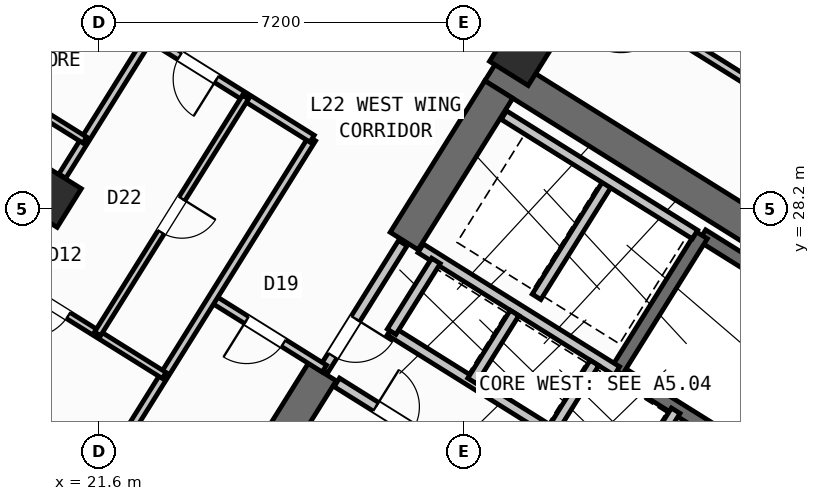
"""IFC4 building model, lengths in metres.
Left out: names, types, materials, properties, quantities, classifications, styles, units other than length and angle.
Written with IfcOpenShell. Run it as: python <this file> out.ifc"""

import sys

from ifc_helpers import new_model, si_unit, direction, frame, frame_2d, origin, origin_2d, place, context, subcontext, project, spatial, rectangle, hollow_rectangle, extrude, source, transform, mapped, element, fill, save


model = new_model("IFC4")
c1 = context("Model", 3, precision=1e-05, world=origin(), true_north=direction((0.0, 1.0)))
c2 = subcontext(c1, "Body", "Model", "MODEL_VIEW")
j1 = project(units=[si_unit("LENGTHUNIT", "METRE"), si_unit("PLANEANGLEUNIT", "RADIAN")], contexts=[c1])
p1 = place(None, origin())
s1 = spatial("IfcSite", under=j1, at=p1, CompositionType="ELEMENT")
p2 = place(p1, origin())
s2 = spatial("IfcBuilding", under=s1, at=p2, CompositionType="ELEMENT")
p3 = place(p2, frame((0.0, 0.0, 90.0)))
s3 = spatial("IfcBuildingStorey", under=s2, at=p3, CompositionType="ELEMENT", Elevation=90.0)
p4 = place(p3, frame((40.615, 23.983, 0.0), z_axis=(0.0, 0.0, 1.0), x_axis=(-0.848045953968, 0.529922692436, 0.0)))
e1 = element("IfcWall", 1, at=p4, inside=s3, PredefinedType="SHEAR", context=c2, shape_type="SweptSolid", body=[
    extrude(rectangle(XDim=13.24, YDim=0.65, at=frame_2d((6.62, 0.0))), origin(), (0.0, 0.0, 1.0), 3.35),
])
p5 = place(p3, frame((29.491, 30.552, 0.0), z_axis=(0.0, 0.0, 1.0), x_axis=(-0.529893103397, -0.8480644427, 0.0)))
e2 = element("IfcWall", 2, at=p5, inside=s3, PredefinedType="SHEAR", context=c2, shape_type="SweptSolid", body=[
    extrude(rectangle(XDim=3.525, YDim=0.65, at=frame_2d((1.763, 0.0))), origin(), (0.0, 0.0, 1.0), 3.35),
])
p6 = place(p3, frame((26.007, 24.976, 0.0), z_axis=(0.0, 0.0, 1.0), x_axis=(-0.529916319127, -0.848049936456, 0.0)))
e3 = element("IfcWall", 3, at=p6, inside=s3, PredefinedType="SHEAR", context=c2, shape_type="SweptSolid", body=[
    extrude(rectangle(XDim=6.375, YDim=0.65, at=frame_2d((3.188, 0.0))), origin(), (0.0, 0.0, 1.0), 3.35),
])
m1 = source(origin(), c2, "Body", "SweptSolid", [
    extrude(hollow_rectangle(XDim=0.9, YDim=0.9, WallThickness=0.036, at=origin_2d()), origin(), (0.0, 0.0, 1.0), 3.6),
])
for number, where, z_axis, x_axis in (
    (4, (29.928, 31.251, 0.0), (0.0, 0.0, 1.0), (-0.848, 0.53, 0.0)),
    (5, (20.632, 28.452, 0.0), (0.0, 0.0, 1.0), (-0.848, 0.53, 0.0)),
):
    element("IfcColumn", number, at=place(p3, frame(where, z_axis=z_axis, x_axis=x_axis)), inside=s3, PredefinedType="COLUMN", context=c2, shape_type="MappedRepresentation", body=[
        mapped(m1, transform((0.0, 0.0, 0.0), scale=1.0)),
    ])
p7 = place(p3, frame((31.76, 12.183, 0.0), z_axis=(0.0, 0.0, 1.0), x_axis=(-0.848047074256, 0.529920899612, 0.0)))
e6 = element("IfcWall", 6, at=p7, inside=s3, PredefinedType="STANDARD", context=c2, shape_type="SweptSolid", body=[
    extrude(rectangle(XDim=30.652, YDim=0.32, at=frame_2d((15.326, 0.0))), origin(), (0.0, 0.0, 1.0), 3.35),
])
p8 = place(p7, frame((15.153, 0.0, 0.0)))
e7 = element("IfcOpeningElement", 7, at=p8, cuts=e6, PredefinedType="OPENING", context=c2, shape_type="SweptSolid", body=[
    extrude(rectangle(XDim=1.2, YDim=2.15, at=frame_2d((0.6, 1.075))), frame((0.0, 0.17, 0.0), z_axis=(0.0, -1.0, 0.0), x_axis=(1.0, 0.0, 0.0)), (0.0, 0.0, 1.0), 0.34),
])
p9 = place(p7, frame((2.002, 0.0, 0.8)))
e8 = element("IfcOpeningElement", 8, at=p9, cuts=e6, PredefinedType="OPENING", context=c2, shape_type="SweptSolid", body=[
    extrude(rectangle(XDim=2.1, YDim=1.55, at=frame_2d((1.05, 0.775))), frame((0.0, 0.17, 0.0), z_axis=(0.0, -1.0, 0.0), x_axis=(1.0, 0.0, 0.0)), (0.0, 0.0, 1.0), 0.34),
])
p10 = place(p7, frame((7.206, 0.0, 0.8)))
e9 = element("IfcOpeningElement", 9, at=p10, cuts=e6, PredefinedType="OPENING", context=c2, shape_type="SweptSolid", body=[
    extrude(rectangle(XDim=2.1, YDim=1.55, at=frame_2d((1.05, 0.775))), frame((0.0, 0.17, 0.0), z_axis=(0.0, -1.0, 0.0), x_axis=(1.0, 0.0, 0.0)), (0.0, 0.0, 1.0), 0.34),
])
p11 = place(p7, frame((12.648, 0.0, 1.0)))
e10 = element("IfcOpeningElement", 10, at=p11, cuts=e6, PredefinedType="OPENING", context=c2, shape_type="SweptSolid", body=[
    extrude(rectangle(XDim=0.9, YDim=1.25, at=frame_2d((0.45, 0.625))), frame((0.0, 0.17, 0.0), z_axis=(0.0, -1.0, 0.0), x_axis=(1.0, 0.0, 0.0)), (0.0, 0.0, 1.0), 0.34),
])
p12 = place(p7, frame((27.974, 0.0, 0.95)))
e11 = element("IfcOpeningElement", 11, at=p12, cuts=e6, PredefinedType="OPENING", context=c2, shape_type="SweptSolid", body=[
    extrude(rectangle(XDim=1.2, YDim=1.4, at=frame_2d((0.6, 0.7))), frame((0.0, 0.17, 0.0), z_axis=(0.0, -1.0, 0.0), x_axis=(1.0, 0.0, 0.0)), (0.0, 0.0, 1.0), 0.34),
])
p13 = place(p7, frame((18.347, 0.0, 1.0)))
e12 = element("IfcOpeningElement", 12, at=p13, cuts=e6, PredefinedType="OPENING", context=c2, shape_type="SweptSolid", body=[
    extrude(rectangle(XDim=0.9, YDim=1.25, at=frame_2d((0.45, 0.625))), frame((0.0, 0.17, 0.0), z_axis=(0.0, -1.0, 0.0), x_axis=(1.0, 0.0, 0.0)), (0.0, 0.0, 1.0), 0.34),
])
p14 = place(p7, frame((20.931, 0.0, 1.0)))
e13 = element("IfcOpeningElement", 13, at=p14, cuts=e6, PredefinedType="OPENING", context=c2, shape_type="SweptSolid", body=[
    extrude(rectangle(XDim=0.65, YDim=1.15, at=frame_2d((0.325, 0.575))), frame((0.0, 0.17, 0.0), z_axis=(0.0, -1.0, 0.0), x_axis=(1.0, 0.0, 0.0)), (0.0, 0.0, 1.0), 0.34),
])
p15 = place(p7, frame((22.938, 0.0, 1.0)))
e14 = element("IfcOpeningElement", 14, at=p15, cuts=e6, PredefinedType="OPENING", context=c2, shape_type="SweptSolid", body=[
    extrude(rectangle(XDim=0.9, YDim=1.25, at=frame_2d((0.45, 0.625))), frame((0.0, 0.17, 0.0), z_axis=(0.0, -1.0, 0.0), x_axis=(1.0, 0.0, 0.0)), (0.0, 0.0, 1.0), 0.34),
])
p16 = place(p7, frame((25.069, 0.0, 1.0)))
e15 = element("IfcOpeningElement", 15, at=p16, cuts=e6, PredefinedType="OPENING", context=c2, shape_type="SweptSolid", body=[
    extrude(rectangle(XDim=0.9, YDim=1.25, at=frame_2d((0.45, 0.625))), frame((0.0, 0.17, 0.0), z_axis=(0.0, -1.0, 0.0), x_axis=(1.0, 0.0, 0.0)), (0.0, 0.0, 1.0), 0.34),
])
p17 = place(p3, frame((39.721, 23.788, 0.0), z_axis=(0.0, 0.0, 1.0), x_axis=(-0.848054434086, 0.529909121291, 0.0)))
e16 = element("IfcWall", 16, at=p17, inside=s3, PredefinedType="SHEAR", context=c2, shape_type="SweptSolid", body=[
    extrude(rectangle(XDim=7.33, YDim=0.26, at=frame_2d((3.665, 0.0))), origin(), (0.0, 0.0, 1.0), 3.35),
])
p18 = place(p3, frame((38.046, 21.108, 0.0), z_axis=(0.0, 0.0, 1.0), x_axis=(-0.848054434086, 0.529909121291, 0.0)))
e17 = element("IfcWall", 17, at=p18, inside=s3, PredefinedType="SHEAR", context=c2, shape_type="SweptSolid", body=[
    extrude(rectangle(XDim=7.33, YDim=0.26, at=frame_2d((3.665, 0.0))), origin(), (0.0, 0.0, 1.0), 3.35),
])
p19 = place(p18, frame((0.22, 0.0, 0.0)))
e18 = element("IfcOpeningElement", 18, at=p19, cuts=e17, PredefinedType="OPENING", context=c2, shape_type="SweptSolid", body=[
    extrude(rectangle(XDim=1.1, YDim=2.1, at=frame_2d((0.55, 1.05))), frame((0.0, 0.14, 0.0), z_axis=(0.0, -1.0, 0.0), x_axis=(1.0, 0.0, 0.0)), (0.0, 0.0, 1.0), 0.28),
])
p20 = place(p3, frame((33.496, 27.677, 0.0), z_axis=(0.0, 0.0, 1.0), x_axis=(-0.529908658664, -0.84805472316, 0.0)))
e19 = element("IfcWall", 19, at=p20, inside=s3, PredefinedType="SHEAR", context=c2, shape_type="SweptSolid", body=[
    extrude(rectangle(XDim=3.16, YDim=0.26, at=frame_2d((1.58, 0.0))), origin(), (0.0, 0.0, 1.0), 3.35),
])
p21 = place(p3, frame((31.822, 24.998, 0.0), z_axis=(0.0, 0.0, 1.0), x_axis=(-0.848058348634, 0.529902856485, 0.0)))
e20 = element("IfcWall", 20, at=p21, inside=s3, PredefinedType="STANDARD", context=c2, shape_type="SweptSolid", body=[
    extrude(rectangle(XDim=4.568, YDim=0.2, at=frame_2d((2.284, 0.0))), origin(), (0.0, 0.0, 1.0), 3.34),
])
p22 = place(p3, frame((32.108, 22.814, 0.0), z_axis=(0.0, 0.0, 1.0), x_axis=(-0.848042229521, 0.529928652696, 0.0)))
e21 = element("IfcWall", 21, at=p22, inside=s3, PredefinedType="STANDARD", context=c2, shape_type="SweptSolid", body=[
    extrude(rectangle(XDim=5.62, YDim=0.2, at=frame_2d((2.81, 0.0))), origin(), (0.0, 0.0, 1.0), 3.34),
])
p23 = place(p3, frame((32.982, 24.213, 0.0), z_axis=(0.0, 0.0, 1.0), x_axis=(-0.529839334948, -0.84809803628, 0.0)))
e22 = element("IfcWall", 22, at=p23, inside=s3, PredefinedType="STANDARD", context=c2, shape_type="SweptSolid", body=[
    extrude(rectangle(XDim=1.65, YDim=0.2, at=frame_2d((0.825, 0.0))), origin(), (0.0, 0.0, 1.0), 3.34),
])
p24 = place(p3, frame((28.25, 27.17, 0.0), z_axis=(0.0, 0.0, 1.0), x_axis=(-0.529905827651, -0.848056492117, 0.0)))
e23 = element("IfcWall", 23, at=p24, inside=s3, PredefinedType="STANDARD", context=c2, shape_type="SweptSolid", body=[
    extrude(rectangle(XDim=1.65, YDim=0.2, at=frame_2d((0.825, 0.0))), origin(), (0.0, 0.0, 1.0), 3.34),
])
p25 = place(p3, frame((31.645, 28.716, 0.0), z_axis=(0.0, 0.0, 1.0), x_axis=(-0.52986693015, -0.848080795876, 0.0)))
e24 = element("IfcWall", 24, at=p25, inside=s3, PredefinedType="STANDARD", context=c2, shape_type="SweptSolid", body=[
    extrude(rectangle(XDim=2.66, YDim=0.2, at=frame_2d((1.33, 0.0))), origin(), (0.0, 0.0, 1.0), 3.34),
])
p26 = place(p3, frame((33.363, 27.69, 0.0), z_axis=(0.0, 0.0, 1.0), x_axis=(-0.848053806312, 0.529910125964, 0.0)))
e25 = element("IfcWall", 25, at=p26, inside=s3, PredefinedType="STANDARD", context=c2, shape_type="SweptSolid", body=[
    extrude(rectangle(XDim=4.448, YDim=0.2, at=frame_2d((2.224, 0.0))), origin(), (0.0, 0.0, 1.0), 3.34),
])
for number, where, z_axis, x_axis in (
    (26, (31.379, 25.156, 0.0), (0.0, 0.0, 1.0), (-0.53, -0.848, 0.0)),
    (27, (29.801, 26.142, 0.0), (0.0, 0.0, 1.0), (-0.53, -0.848, 0.0)),
):
    element("IfcWall", number, at=place(p3, frame(where, z_axis=z_axis, x_axis=x_axis)), inside=s3, PredefinedType="STANDARD", context=c2, shape_type="SweptSolid", body=[
        extrude(rectangle(XDim=1.58, YDim=0.2, at=frame_2d((0.79, 0.0))), origin(), (0.0, 0.0, 1.0), 3.34),
    ])
p27 = place(p3, frame((31.525, 21.504, 0.0), z_axis=(0.0, 0.0, 1.0), x_axis=(-0.848044998614, 0.529924221305, 0.0)))
e28 = element("IfcWall", 28, at=p27, inside=s3, PredefinedType="STANDARD", context=c2, shape_type="SweptSolid", body=[
    extrude(rectangle(XDim=6.168, YDim=0.2, at=frame_2d((3.084, 0.0))), origin(), (0.0, 0.0, 1.0), 3.34),
])
p28 = place(p27, frame((4.4, 0.0, 0.0)))
e29 = element("IfcOpeningElement", 29, at=p28, cuts=e28, PredefinedType="OPENING", context=c2, shape_type="SweptSolid", body=[
    extrude(rectangle(XDim=0.86, YDim=2.05, at=frame_2d((0.43, 1.025))), frame((0.0, 0.11, 0.0), z_axis=(0.0, -1.0, 0.0), x_axis=(1.0, 0.0, 0.0)), (0.0, 0.0, 1.0), 0.22),
])
p29 = place(p27, frame((0.35, 0.0, 0.0)))
e30 = element("IfcOpeningElement", 30, at=p29, cuts=e28, PredefinedType="OPENING", context=c2, shape_type="SweptSolid", body=[
    extrude(rectangle(XDim=0.86, YDim=2.05, at=frame_2d((0.43, 1.025))), frame((0.0, 0.11, 0.0), z_axis=(0.0, -1.0, 0.0), x_axis=(1.0, 0.0, 0.0)), (0.0, 0.0, 1.0), 0.22),
])
p30 = place(p3, frame((27.596, 27.52, 0.0), z_axis=(0.0, 0.0, 1.0), x_axis=(-0.529865479138, -0.848081702443, 0.0)))
e31 = element("IfcWall", 31, at=p30, inside=s3, PredefinedType="STANDARD", context=c2, shape_type="SweptSolid", body=[
    extrude(rectangle(XDim=2.96, YDim=0.2, at=frame_2d((1.48, 0.0))), origin(), (0.0, 0.0, 1.0), 3.34),
])
p31 = place(p30, frame((1.76, 0.0, 0.0)))
e32 = element("IfcOpeningElement", 32, at=p31, cuts=e31, PredefinedType="OPENING", context=c2, shape_type="SweptSolid", body=[
    extrude(rectangle(XDim=0.86, YDim=2.05, at=frame_2d((0.43, 1.025))), frame((0.0, 0.11, 0.0), z_axis=(0.0, -1.0, 0.0), x_axis=(1.0, 0.0, 0.0)), (0.0, 0.0, 1.0), 0.22),
])
p32 = place(p3, frame((26.049, 25.044, 0.0), z_axis=(0.0, 0.0, 1.0), x_axis=(-0.848050851465, 0.529914854792, 0.0)))
e33 = element("IfcWall", 33, at=p32, inside=s3, PredefinedType="PARTITIONING", context=c2, shape_type="SweptSolid", body=[
    extrude(rectangle(XDim=2.61, YDim=0.16, at=frame_2d((1.305, 0.0))), origin(), (0.0, 0.0, 1.0), 2.775),
])
p33 = place(p32, frame((0.95, 0.0, 0.0)))
e34 = element("IfcOpeningElement", 34, at=p33, cuts=e33, PredefinedType="OPENING", context=c2, shape_type="SweptSolid", body=[
    extrude(rectangle(XDim=0.86, YDim=2.05, at=frame_2d((0.43, 1.025))), frame((0.0, 0.09, 0.0), z_axis=(0.0, -1.0, 0.0), x_axis=(1.0, 0.0, 0.0)), (0.0, 0.0, 1.0), 0.18),
])
p34 = place(p3, frame((25.807, 29.582, 0.0), z_axis=(0.0, 0.0, 1.0), x_axis=(-0.529920357077, -0.848047413271, 0.0)))
e35 = element("IfcWall", 35, at=p34, inside=s3, PredefinedType="PARTITIONING", context=c2, shape_type="SweptSolid", body=[
    extrude(rectangle(XDim=11.45, YDim=0.16, at=frame_2d((5.725, 0.0))), origin(), (0.0, 0.0, 1.0), 3.34),
])
p35 = place(p3, frame((25.807, 29.582, 0.0), z_axis=(0.0, 0.0, 1.0), x_axis=(-0.848052408131, 0.529912363569, 0.0)))
e36 = element("IfcWall", 36, at=p35, inside=s3, PredefinedType="PARTITIONING", context=c2, shape_type="SweptSolid", body=[
    extrude(rectangle(XDim=16.73, YDim=0.16, at=frame_2d((8.365, 0.0))), origin(), (0.0, 0.0, 1.0), 3.34),
])
p36 = place(p35, frame((2.22, 0.0, 0.0)))
e37 = element("IfcOpeningElement", 37, at=p36, cuts=e36, PredefinedType="OPENING", context=c2, shape_type="SweptSolid", body=[
    extrude(rectangle(XDim=0.86, YDim=2.05, at=frame_2d((0.43, 1.025))), frame((0.0, 0.09, 0.0), z_axis=(0.0, -1.0, 0.0), x_axis=(1.0, 0.0, 0.0)), (0.0, 0.0, 1.0), 0.18),
])
p37 = place(p35, frame((14.013, 0.0, 0.0)))
e38 = element("IfcOpeningElement", 38, at=p37, cuts=e36, PredefinedType="OPENING", context=c2, shape_type="SweptSolid", body=[
    extrude(rectangle(XDim=1.0, YDim=2.1, at=frame_2d((0.5, 1.05))), frame((0.0, 0.09, 0.0), z_axis=(0.0, -1.0, 0.0), x_axis=(1.0, 0.0, 0.0)), (0.0, 0.0, 1.0), 0.18),
])
p38 = place(p3, frame((22.593, 31.59, 0.0), z_axis=(0.0, 0.0, 1.0), x_axis=(-0.529924383291, -0.848044897393, 0.0)))
e39 = element("IfcWall", 39, at=p38, inside=s3, PredefinedType="PARTITIONING", context=c2, shape_type="SweptSolid", body=[
    extrude(rectangle(XDim=3.238, YDim=0.16, at=frame_2d((1.619, 0.0))), origin(), (0.0, 0.0, 1.0), 2.775),
])
p39 = place(p3, frame((22.887, 24.909, 0.0), z_axis=(0.0, 0.0, 1.0), x_axis=(-0.84803087207, 0.529946827537, 0.0)))
e40 = element("IfcWall", 40, at=p39, inside=s3, PredefinedType="PLUMBINGWALL", context=c2, shape_type="SweptSolid", body=[
    extrude(rectangle(XDim=3.79, YDim=0.14, at=frame_2d((1.895, 0.0))), origin(), (0.0, 0.0, 1.0), 3.34),
])
p40 = place(p39, frame((2.23, 0.0, 0.0)))
e41 = element("IfcOpeningElement", 41, at=p40, cuts=e40, PredefinedType="OPENING", context=c2, shape_type="SweptSolid", body=[
    extrude(rectangle(XDim=0.92, YDim=2.08, at=frame_2d((0.46, 1.04))), frame((0.0, 0.08, 0.0), z_axis=(0.0, -1.0, 0.0), x_axis=(1.0, 0.0, 0.0)), (0.0, 0.0, 1.0), 0.16),
])
p41 = place(p3, frame((24.492, 30.403, 0.0), z_axis=(0.0, 0.0, 1.0), x_axis=(-0.529919283494, -0.848048084121, 0.0)))
e42 = element("IfcWall", 42, at=p41, inside=s3, PredefinedType="PLUMBINGWALL", context=c2, shape_type="SweptSolid", body=[
    extrude(rectangle(XDim=5.51, YDim=0.14, at=frame_2d((2.755, 0.0))), origin(), (0.0, 0.0, 1.0), 2.995),
])
p42 = place(p41, frame((2.365, 0.0, 0.0)))
e43 = element("IfcOpeningElement", 43, at=p42, cuts=e42, PredefinedType="OPENING", context=c2, shape_type="SweptSolid", body=[
    extrude(rectangle(XDim=0.78, YDim=2.05, at=frame_2d((0.39, 1.025))), frame((0.0, 0.08, 0.0), z_axis=(0.0, -1.0, 0.0), x_axis=(1.0, 0.0, 0.0)), (0.0, 0.0, 1.0), 0.16),
])
p43 = place(p3, frame((21.321, 29.554, 0.0), z_axis=(0.0, 0.0, 1.0), x_axis=(-0.84803529765, 0.529939745575, 0.0)))
e44 = element("IfcWall", 44, at=p43, inside=s3, PredefinedType="PLUMBINGWALL", context=c2, shape_type="SweptSolid", body=[
    extrude(rectangle(XDim=8.527, YDim=0.14, at=frame_2d((4.264, 0.0))), origin(), (0.0, 0.0, 1.0), 3.34),
])
p44 = place(p43, frame((5.155, 0.0, 0.0)))
e45 = element("IfcOpeningElement", 45, at=p44, cuts=e44, PredefinedType="OPENING", context=c2, shape_type="SweptSolid", body=[
    extrude(rectangle(XDim=0.78, YDim=2.05, at=frame_2d((0.39, 1.025))), frame((0.0, 0.08, 0.0), z_axis=(0.0, -1.0, 0.0), x_axis=(1.0, 0.0, 0.0)), (0.0, 0.0, 1.0), 0.16),
])
p45 = place(p43, frame((1.011, 0.0, 0.0)))
e46 = element("IfcOpeningElement", 46, at=p45, cuts=e44, PredefinedType="OPENING", context=c2, shape_type="SweptSolid", body=[
    extrude(rectangle(XDim=0.78, YDim=2.05, at=frame_2d((0.39, 1.025))), frame((0.0, 0.08, 0.0), z_axis=(0.0, -1.0, 0.0), x_axis=(1.0, 0.0, 0.0)), (0.0, 0.0, 1.0), 0.16),
])
p46 = place(p3, frame((41.936, 26.012, 0.0), z_axis=(0.0, 0.0, 1.0), x_axis=(-0.848051154596, 0.529914369676, 0.0)))
e47 = element("IfcWall", 47, at=p46, inside=s3, PredefinedType="PARTITIONING", context=c2, shape_type="SweptSolid", body=[
    extrude(rectangle(XDim=15.57, YDim=0.16, at=frame_2d((7.785, 0.0))), origin(), (0.0, 0.0, 1.0), 3.34),
])
p47 = place(p46, frame((10.83, 0.0, 0.0)))
e48 = element("IfcOpeningElement", 48, at=p47, cuts=e47, PredefinedType="OPENING", context=c2, shape_type="SweptSolid", body=[
    extrude(rectangle(XDim=1.0, YDim=2.1, at=frame_2d((0.5, 1.05))), frame((0.0, 0.09, 0.0), z_axis=(0.0, -1.0, 0.0), x_axis=(1.0, 0.0, 0.0)), (0.0, 0.0, 1.0), 0.18),
])
p48 = place(p3, frame((42.226, 28.873, 0.0), z_axis=(0.0, 0.0, 1.0), x_axis=(-0.848049134363, 0.529917602752, 0.0)))
e49 = element("IfcWall", 49, at=p48, inside=s3, PredefinedType="PLUMBINGWALL", context=c2, shape_type="SweptSolid", body=[
    extrude(rectangle(XDim=14.3, YDim=0.14, at=frame_2d((7.15, 0.0))), origin(), (0.0, 0.0, 1.0), 3.34),
])
p49 = place(p48, frame((9.57, 0.0, 0.0)))
e50 = element("IfcOpeningElement", 50, at=p49, cuts=e49, PredefinedType="OPENING", context=c2, shape_type="SweptSolid", body=[
    extrude(rectangle(XDim=0.92, YDim=2.08, at=frame_2d((0.46, 1.04))), frame((0.0, 0.08, 0.0), z_axis=(0.0, -1.0, 0.0), x_axis=(1.0, 0.0, 0.0)), (0.0, 0.0, 1.0), 0.16),
])
m2 = source(origin(), c2, "Body", "SweptSolid", [
    extrude(rectangle(XDim=0.86, YDim=2.05, at=frame_2d((0.43, 1.025))), frame((0.0, 0.025, 0.0), z_axis=(0.0, -1.0, 0.0), x_axis=(1.0, 0.0, 0.0)), (0.0, 0.0, 1.0), 0.05),
])
p50 = place(p28, frame((0.86, 0.0, 0.0), z_axis=(0.0, 0.0, 1.0), x_axis=(-1.0, 0.0, 0.0)))
e51 = element("IfcDoor", 51, at=p50, inside=s3, OperationType="SINGLE_SWING_LEFT", PredefinedType="DOOR", context=c2, shape_type="MappedRepresentation", body=[
    mapped(m2, transform((0.0, 0.0, 0.0), scale=1.0)),
])
fill(e29, e51)
p51 = place(p33, origin())
e52 = element("IfcDoor", 52, at=p51, inside=s3, OperationType="SINGLE_SWING_RIGHT", PredefinedType="DOOR", context=c2, shape_type="MappedRepresentation", body=[
    mapped(m2, transform((0.0, 0.0, 0.0), scale=1.0)),
])
fill(e34, e52)
p52 = place(p31, origin())
e53 = element("IfcDoor", 53, at=p52, inside=s3, OperationType="SINGLE_SWING_LEFT", PredefinedType="DOOR", context=c2, shape_type="MappedRepresentation", body=[
    mapped(m2, transform((0.0, 0.0, 0.0), scale=1.0)),
])
fill(e32, e53)
p53 = place(p36, origin())
e54 = element("IfcDoor", 54, at=p53, inside=s3, OperationType="SINGLE_SWING_LEFT", PredefinedType="DOOR", context=c2, shape_type="MappedRepresentation", body=[
    mapped(m2, transform((0.0, 0.0, 0.0), scale=1.0)),
])
fill(e37, e54)
m3 = source(origin(), c2, "Body", "SweptSolid", [
    extrude(rectangle(XDim=0.92, YDim=2.08, at=frame_2d((0.46, 1.04))), frame((0.0, 0.025, 0.0), z_axis=(0.0, -1.0, 0.0), x_axis=(1.0, 0.0, 0.0)), (0.0, 0.0, 1.0), 0.05),
])
p54 = place(p40, origin())
e55 = element("IfcDoor", 55, at=p54, inside=s3, OperationType="SINGLE_SWING_RIGHT", PredefinedType="DOOR", context=c2, shape_type="MappedRepresentation", body=[
    mapped(m3, transform((0.0, 0.0, 0.0), scale=1.0)),
])
fill(e41, e55)
m4 = source(origin(), c2, "Body", "SweptSolid", [
    extrude(rectangle(XDim=0.78, YDim=2.05, at=frame_2d((0.39, 1.025))), frame((0.0, 0.025, 0.0), z_axis=(0.0, -1.0, 0.0), x_axis=(1.0, 0.0, 0.0)), (0.0, 0.0, 1.0), 0.05),
])
p55 = place(p42, origin())
e56 = element("IfcDoor", 56, at=p55, inside=s3, OperationType="SINGLE_SWING_LEFT", PredefinedType="DOOR", context=c2, shape_type="MappedRepresentation", body=[
    mapped(m4, transform((0.0, 0.0, 0.0), scale=1.0)),
])
fill(e43, e56)
save(model, sys.argv[1])
